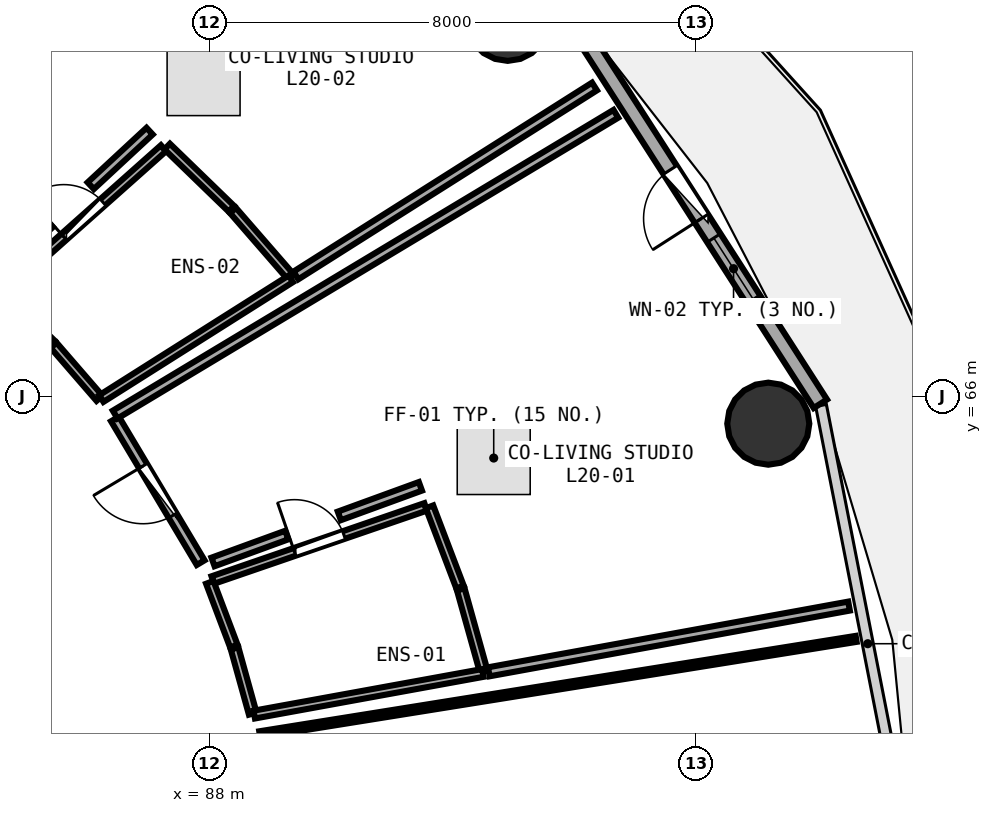
"""IFC4 building model, lengths in metres.
Left out: names, types, materials, properties, quantities, classifications, styles, units other than length and angle.
Written with IfcOpenShell. Run it as: python <this file> out.ifc"""

import sys

from ifc_helpers import new_model, si_unit, direction, frame, frame_2d, origin, origin_2d, place, context, subcontext, project, spatial, rectangle, circle, extrude, element, fill, save


model = new_model("IFC4")
c1 = context("Model", 3, precision=1e-05, world=origin(), true_north=direction((0.0, 1.0)))
c2 = subcontext(c1, "Body", "Model", "MODEL_VIEW")
j1 = project(units=[si_unit("LENGTHUNIT", "METRE"), si_unit("PLANEANGLEUNIT", "RADIAN")], contexts=[c1])
p1 = place(None, origin())
s1 = spatial("IfcSite", under=j1, at=p1, CompositionType="ELEMENT")
p2 = place(p1, origin())
s2 = spatial("IfcBuilding", under=s1, at=p2, CompositionType="ELEMENT")
p3 = place(p2, frame((0.0, 0.0, 80.1)))
s3 = spatial("IfcBuildingStorey", under=s2, at=p3, CompositionType="ELEMENT", Elevation=80.1)
for number, where, z_axis, x_axis in (
    (1, (97.192, 65.552, 0.0), (0.0, 0.0, 1.0), (1.0, 0.0, 0.0)),
    (2, (92.906, 72.193, 0.0), (0.0, 0.0, 1.0), (1.0, 0.0, 0.0)),
):
    element("IfcColumn", number, at=place(p3, frame(where, z_axis=z_axis, x_axis=x_axis)), inside=s3, PredefinedType="COLUMN", context=c2, shape_type="SweptSolid", body=[
        extrude(circle(Radius=0.675, at=origin_2d()), origin(), (0.0, 0.0, 1.0), 3.75),
    ])
p4 = place(p3, frame((98.048, 65.879, 0.0), z_axis=(0.0, 0.0, 1.0), x_axis=(-0.540620528459, 0.841266571432, 0.0)))
e3 = element("IfcWall", 3, at=p4, inside=s3, PredefinedType="SOLIDWALL", context=c2, shape_type="SweptSolid", body=[
    extrude(rectangle(XDim=8.193, YDim=0.26, at=frame_2d((4.096, 0.0))), origin(), (0.0, 0.0, 1.0), 3.475),
])
p5 = place(p4, frame((3.621, 0.0, 0.0)))
e4 = element("IfcOpeningElement", 4, at=p5, cuts=e3, PredefinedType="OPENING", context=c2, shape_type="SweptSolid", body=[
    extrude(rectangle(XDim=0.95, YDim=2.1, at=frame_2d((0.475, 1.05))), frame((0.0, 0.14, 0.0), z_axis=(0.0, -1.0, 0.0), x_axis=(1.0, 0.0, 0.0)), (0.0, 0.0, 1.0), 0.28),
])
p6 = place(p4, frame((2.041, 0.0, 0.85)))
e5 = element("IfcOpeningElement", 5, at=p6, cuts=e3, PredefinedType="OPENING", context=c2, shape_type="SweptSolid", body=[
    extrude(rectangle(XDim=1.2, YDim=1.45, at=frame_2d((0.6, 0.725))), frame((0.0, 0.14, 0.0), z_axis=(0.0, -1.0, 0.0), x_axis=(1.0, 0.0, 0.0)), (0.0, 0.0, 1.0), 0.28),
])
p7 = place(p3, frame((88.056, 62.98, 0.0), z_axis=(0.0, 0.0, 1.0), x_axis=(0.94570750663, 0.325018940838, 0.0)))
e6 = element("IfcWall", 6, at=p7, inside=s3, PredefinedType="PLUMBINGWALL", context=c2, shape_type="SweptSolid", body=[
    extrude(rectangle(XDim=3.702, YDim=0.13, at=frame_2d((1.851, 0.0))), origin(), (0.0, 0.0, 1.0), 3.175),
])
p8 = place(p7, frame((1.421, 0.0, 0.0)))
e7 = element("IfcOpeningElement", 7, at=p8, cuts=e6, PredefinedType="OPENING", context=c2, shape_type="SweptSolid", body=[
    extrude(rectangle(XDim=0.86, YDim=2.05, at=frame_2d((0.43, 1.025))), frame((0.0, 0.075, 0.0), z_axis=(0.0, -1.0, 0.0), x_axis=(1.0, 0.0, 0.0)), (0.0, 0.0, 1.0), 0.15),
])
p9 = place(p3, frame((87.856, 63.267, 0.0), z_axis=(0.0, 0.0, 1.0), x_axis=(-0.512288635556, 0.858813340535, 0.0)))
e8 = element("IfcWall", 8, at=p9, inside=s3, PredefinedType="PARTITIONING", context=c2, shape_type="SweptSolid", body=[
    extrude(rectangle(XDim=2.751, YDim=0.15, at=frame_2d((1.375, 0.0))), origin(), (0.0, 0.0, 1.0), 2.925),
])
p10 = place(p9, frame((0.901, 0.0, 0.0)))
e9 = element("IfcOpeningElement", 9, at=p10, cuts=e8, PredefinedType="OPENING", context=c2, shape_type="SweptSolid", body=[
    extrude(rectangle(XDim=0.95, YDim=2.08, at=frame_2d((0.475, 1.04))), frame((0.0, 0.085, 0.0), z_axis=(0.0, -1.0, 0.0), x_axis=(1.0, 0.0, 0.0)), (0.0, 0.0, 1.0), 0.17),
])
p11 = place(p3, frame((84.609, 67.736, 0.0), z_axis=(0.0, 0.0, 1.0), x_axis=(0.746989483068, 0.664835853565, 0.0)))
e10 = element("IfcWall", 10, at=p11, inside=s3, PredefinedType="PLUMBINGWALL", context=c2, shape_type="SweptSolid", body=[
    extrude(rectangle(XDim=3.531, YDim=0.13, at=frame_2d((1.765, 0.0))), origin(), (0.0, 0.0, 1.0), 3.175),
])
p12 = place(p11, frame((1.335, 0.0, 0.0)))
e11 = element("IfcOpeningElement", 11, at=p12, cuts=e10, PredefinedType="OPENING", context=c2, shape_type="SweptSolid", body=[
    extrude(rectangle(XDim=0.86, YDim=2.05, at=frame_2d((0.43, 1.025))), frame((0.0, 0.075, 0.0), z_axis=(0.0, -1.0, 0.0), x_axis=(1.0, 0.0, 0.0)), (0.0, 0.0, 1.0), 0.15),
])
p13 = place(p3, frame((88.713, 60.783, 0.0), z_axis=(0.0, 0.0, 1.0), x_axis=(-0.267768177699, 0.963483369349, 0.0)))
e12 = element("IfcWall", 12, at=p13, inside=s3, PredefinedType="PLUMBINGWALL", context=c2, shape_type="SweptSolid", body=[
    extrude(rectangle(XDim=1.114, YDim=0.13, at=frame_2d((0.557, 0.0))), origin(), (0.0, 0.0, 1.0), 3.48),
])
p14 = place(p3, frame((88.402, 61.895, 0.0), z_axis=(0.0, 0.0, 1.0), x_axis=(-0.353392089541, 0.935475296868, 0.0)))
e13 = element("IfcWall", 13, at=p14, inside=s3, PredefinedType="PLUMBINGWALL", context=c2, shape_type="SweptSolid", body=[
    extrude(rectangle(XDim=1.12, YDim=0.13, at=frame_2d((0.56, 0.0))), origin(), (0.0, 0.0, 1.0), 3.235),
])
p15 = place(p3, frame((91.62, 64.184, 0.0), z_axis=(0.0, 0.0, 1.0), x_axis=(0.355383981736, -0.934720399652, 0.0)))
e14 = element("IfcWall", 14, at=p15, inside=s3, PredefinedType="PLUMBINGWALL", context=c2, shape_type="SweptSolid", body=[
    extrude(rectangle(XDim=1.412, YDim=0.13, at=frame_2d((0.706, 0.0))), origin(), (0.0, 0.0, 1.0), 3.48),
])
p16 = place(p3, frame((92.135, 62.827, 0.0), z_axis=(0.0, 0.0, 1.0), x_axis=(0.268855284743, -0.963180583206, 0.0)))
e15 = element("IfcWall", 15, at=p16, inside=s3, PredefinedType="PLUMBINGWALL", context=c2, shape_type="SweptSolid", body=[
    extrude(rectangle(XDim=1.403, YDim=0.13, at=frame_2d((0.702, 0.0))), origin(), (0.0, 0.0, 1.0), 3.48),
])
p17 = place(p3, frame((92.497, 61.452, 0.0), z_axis=(0.0, 0.0, 1.0), x_axis=(-0.983811592037, -0.17920589101, 0.0)))
e16 = element("IfcWall", 16, at=p17, inside=s3, PredefinedType="PLUMBINGWALL", context=c2, shape_type="SweptSolid", body=[
    extrude(rectangle(XDim=3.821, YDim=0.13, at=frame_2d((1.911, 0.0))), origin(), (0.0, 0.0, 1.0), 3.175),
])
p18 = place(p3, frame((86.45, 65.702, 0.0), z_axis=(0.0, 0.0, 1.0), x_axis=(0.857261851198, 0.514880683731, 0.0)))
e17 = element("IfcWall", 17, at=p18, inside=s3, PredefinedType="PARTITIONING", context=c2, shape_type="SweptSolid", body=[
    extrude(rectangle(XDim=9.606, YDim=0.15, at=frame_2d((4.803, 0.0))), origin(), (0.0, 0.0, 1.0), 2.975),
])
p19 = place(p3, frame((98.52, 62.552, 0.0), z_axis=(0.0, 0.0, 1.0), x_axis=(-0.983768558102, -0.17944197973, 0.0)))
e18 = element("IfcWall", 18, at=p19, inside=s3, PredefinedType="PARTITIONING", context=c2, shape_type="SweptSolid", body=[
    extrude(rectangle(XDim=6.022, YDim=0.15, at=frame_2d((3.011, 0.0))), origin(), (0.0, 0.0, 1.0), 2.975),
])
p20 = place(p3, frame((91.47, 64.521, 0.0), z_axis=(0.0, 0.0, 1.0), x_axis=(-0.939526959999, -0.342474950084, 0.0)))
e19 = element("IfcWall", 19, at=p20, inside=s3, PredefinedType="PARTITIONING", context=c2, shape_type="SweptSolid", body=[
    extrude(rectangle(XDim=1.419, YDim=0.15, at=frame_2d((0.71, 0.0))), origin(), (0.0, 0.0, 1.0), 3.175),
])
p21 = place(p3, frame((89.272, 63.72, 0.0), z_axis=(0.0, 0.0, 1.0), x_axis=(-0.939522570491, -0.342486991779, 0.0)))
e20 = element("IfcWall", 20, at=p21, inside=s3, PredefinedType="PARTITIONING", context=c2, shape_type="SweptSolid", body=[
    extrude(rectangle(XDim=1.291, YDim=0.15, at=frame_2d((0.646, 0.0))), origin(), (0.0, 0.0, 1.0), 3.235),
])
p22 = place(p3, frame((86.193, 65.969, 0.0), z_axis=(0.0, 0.0, 1.0), x_axis=(-0.654583900851, 0.755989362853, 0.0)))
e21 = element("IfcWall", 21, at=p22, inside=s3, PredefinedType="PLUMBINGWALL", context=c2, shape_type="SweptSolid", body=[
    extrude(rectangle(XDim=1.153, YDim=0.13, at=frame_2d((0.577, 0.0))), origin(), (0.0, 0.0, 1.0), 3.48),
])
p23 = place(p3, frame((85.411, 66.87, 0.0), z_axis=(0.0, 0.0, 1.0), x_axis=(-0.715871547002, 0.698232001696, 0.0)))
e22 = element("IfcWall", 22, at=p23, inside=s3, PredefinedType="PLUMBINGWALL", context=c2, shape_type="SweptSolid", body=[
    extrude(rectangle(XDim=1.163, YDim=0.13, at=frame_2d((0.581, 0.0))), origin(), (0.0, 0.0, 1.0), 2.925),
])
p24 = place(p3, frame((87.305, 70.109, 0.0), z_axis=(0.0, 0.0, 1.0), x_axis=(0.718235032224, -0.69580057379, 0.0)))
e23 = element("IfcWall", 23, at=p24, inside=s3, PredefinedType="PLUMBINGWALL", context=c2, shape_type="SweptSolid", body=[
    extrude(rectangle(XDim=1.469, YDim=0.13, at=frame_2d((0.735, 0.0))), origin(), (0.0, 0.0, 1.0), 2.925),
])
p25 = place(p3, frame((88.388, 69.058, 0.0), z_axis=(0.0, 0.0, 1.0), x_axis=(0.656315808405, -0.754486288568, 0.0)))
e24 = element("IfcWall", 24, at=p25, inside=s3, PredefinedType="PLUMBINGWALL", context=c2, shape_type="SweptSolid", body=[
    extrude(rectangle(XDim=1.455, YDim=0.13, at=frame_2d((0.728, 0.0))), origin(), (0.0, 0.0, 1.0), 2.925),
])
p26 = place(p3, frame((89.339, 67.934, 0.0), z_axis=(0.0, 0.0, 1.0), x_axis=(-0.845293712827, -0.53430191751, 0.0)))
e25 = element("IfcWall", 25, at=p26, inside=s3, PredefinedType="PLUMBINGWALL", context=c2, shape_type="SweptSolid", body=[
    extrude(rectangle(XDim=3.687, YDim=0.13, at=frame_2d((1.843, 0.0))), origin(), (0.0, 0.0, 1.0), 3.175),
])
p27 = place(p3, frame((81.921, 69.63, 0.0), z_axis=(0.0, 0.0, 1.0), x_axis=(0.574246298275, 0.818682593511, 0.0)))
e26 = element("IfcWall", 26, at=p27, inside=s3, PredefinedType="PARTITIONING", context=c2, shape_type="SweptSolid", body=[
    extrude(rectangle(XDim=8.525, YDim=0.15, at=frame_2d((4.262, 0.0))), origin(), (0.0, 0.0, 1.0), 2.925),
])
p28 = place(p3, frame((94.333, 71.097, 0.0), z_axis=(0.0, 0.0, 1.0), x_axis=(-0.845032344767, -0.534715191759, 0.0)))
e27 = element("IfcWall", 27, at=p28, inside=s3, PredefinedType="PARTITIONING", context=c2, shape_type="SweptSolid", body=[
    extrude(rectangle(XDim=5.811, YDim=0.15, at=frame_2d((2.905, 0.0))), origin(), (0.0, 0.0, 1.0), 2.975),
])
p29 = place(p3, frame((87.017, 70.363, 0.0), z_axis=(0.0, 0.0, 1.0), x_axis=(-0.733142432265, -0.680075123801, 0.0)))
e28 = element("IfcWall", 28, at=p29, inside=s3, PredefinedType="PARTITIONING", context=c2, shape_type="SweptSolid", body=[
    extrude(rectangle(XDim=1.32, YDim=0.15, at=frame_2d((0.66, 0.0))), origin(), (0.0, 0.0, 1.0), 3.175),
])
p30 = place(p3, frame((85.374, 68.839, 0.0), z_axis=(0.0, 0.0, 1.0), x_axis=(-0.733068131904, -0.680155213159, 0.0)))
e29 = element("IfcWall", 29, at=p30, inside=s3, PredefinedType="PARTITIONING", context=c2, shape_type="SweptSolid", body=[
    extrude(rectangle(XDim=1.361, YDim=0.15, at=frame_2d((0.681, 0.0))), origin(), (0.0, 0.0, 1.0), 3.235),
])
p31 = place(p3, frame((88.827, 60.443, 0.0), z_axis=(0.0, 0.0, 1.0), x_axis=(0.987442472226, 0.157978998742, 0.0)))
e30 = element("IfcWall", 30, at=p31, inside=s3, PredefinedType="PARTITIONING", context=c2, shape_type="SweptSolid", body=[
    extrude(rectangle(XDim=9.934, YDim=0.1, at=frame_2d((4.967, 0.0))), origin(), (0.0, 0.0, 1.0), 2.975),
])
p32 = place(p5, frame((0.95, 0.0, 0.0), z_axis=(0.0, 0.0, 1.0), x_axis=(-1.0, 0.0, 0.0)))
e31 = element("IfcDoor", 31, at=p32, inside=s3, OperationType="SINGLE_SWING_RIGHT", PredefinedType="DOOR", context=c2, shape_type="SweptSolid", body=[
    extrude(rectangle(XDim=0.95, YDim=2.1, at=frame_2d((0.475, 1.05))), frame((0.0, 0.025, 0.0), z_axis=(0.0, -1.0, 0.0), x_axis=(1.0, 0.0, 0.0)), (0.0, 0.0, 1.0), 0.05),
])
fill(e4, e31)
p33 = place(p6, origin())
e32 = element("IfcWindow", 32, at=p33, inside=s3, PartitioningType="SINGLE_PANEL", PredefinedType="WINDOW", context=c2, shape_type="SweptSolid", body=[
    extrude(rectangle(XDim=1.2, YDim=1.45, at=frame_2d((0.6, 0.725))), frame((0.0, 0.03, 0.0), z_axis=(0.0, -1.0, 0.0), x_axis=(1.0, 0.0, 0.0)), (0.0, 0.0, 1.0), 0.06),
])
fill(e5, e32)
p34 = place(p8, origin())
e33 = element("IfcDoor", 33, at=p34, inside=s3, OperationType="SINGLE_SWING_LEFT", PredefinedType="DOOR", context=c2, shape_type="SweptSolid", body=[
    extrude(rectangle(XDim=0.86, YDim=2.05, at=frame_2d((0.43, 1.025))), frame((0.0, 0.025, 0.0), z_axis=(0.0, -1.0, 0.0), x_axis=(1.0, 0.0, 0.0)), (0.0, 0.0, 1.0), 0.05),
])
fill(e7, e33)
p35 = place(p10, origin())
e34 = element("IfcDoor", 34, at=p35, inside=s3, OperationType="SINGLE_SWING_RIGHT", PredefinedType="DOOR", context=c2, shape_type="SweptSolid", body=[
    extrude(rectangle(XDim=0.95, YDim=2.08, at=frame_2d((0.475, 1.04))), frame((0.0, 0.025, 0.0), z_axis=(0.0, -1.0, 0.0), x_axis=(1.0, 0.0, 0.0)), (0.0, 0.0, 1.0), 0.05),
])
fill(e9, e34)
p36 = place(p12, origin())
e35 = element("IfcDoor", 35, at=p36, inside=s3, OperationType="SINGLE_SWING_LEFT", PredefinedType="DOOR", context=c2, shape_type="SweptSolid", body=[
    extrude(rectangle(XDim=0.86, YDim=2.05, at=frame_2d((0.43, 1.025))), frame((0.0, 0.025, 0.0), z_axis=(0.0, -1.0, 0.0), x_axis=(1.0, 0.0, 0.0)), (0.0, 0.0, 1.0), 0.05),
])
fill(e11, e35)
save(model, sys.argv[1])
